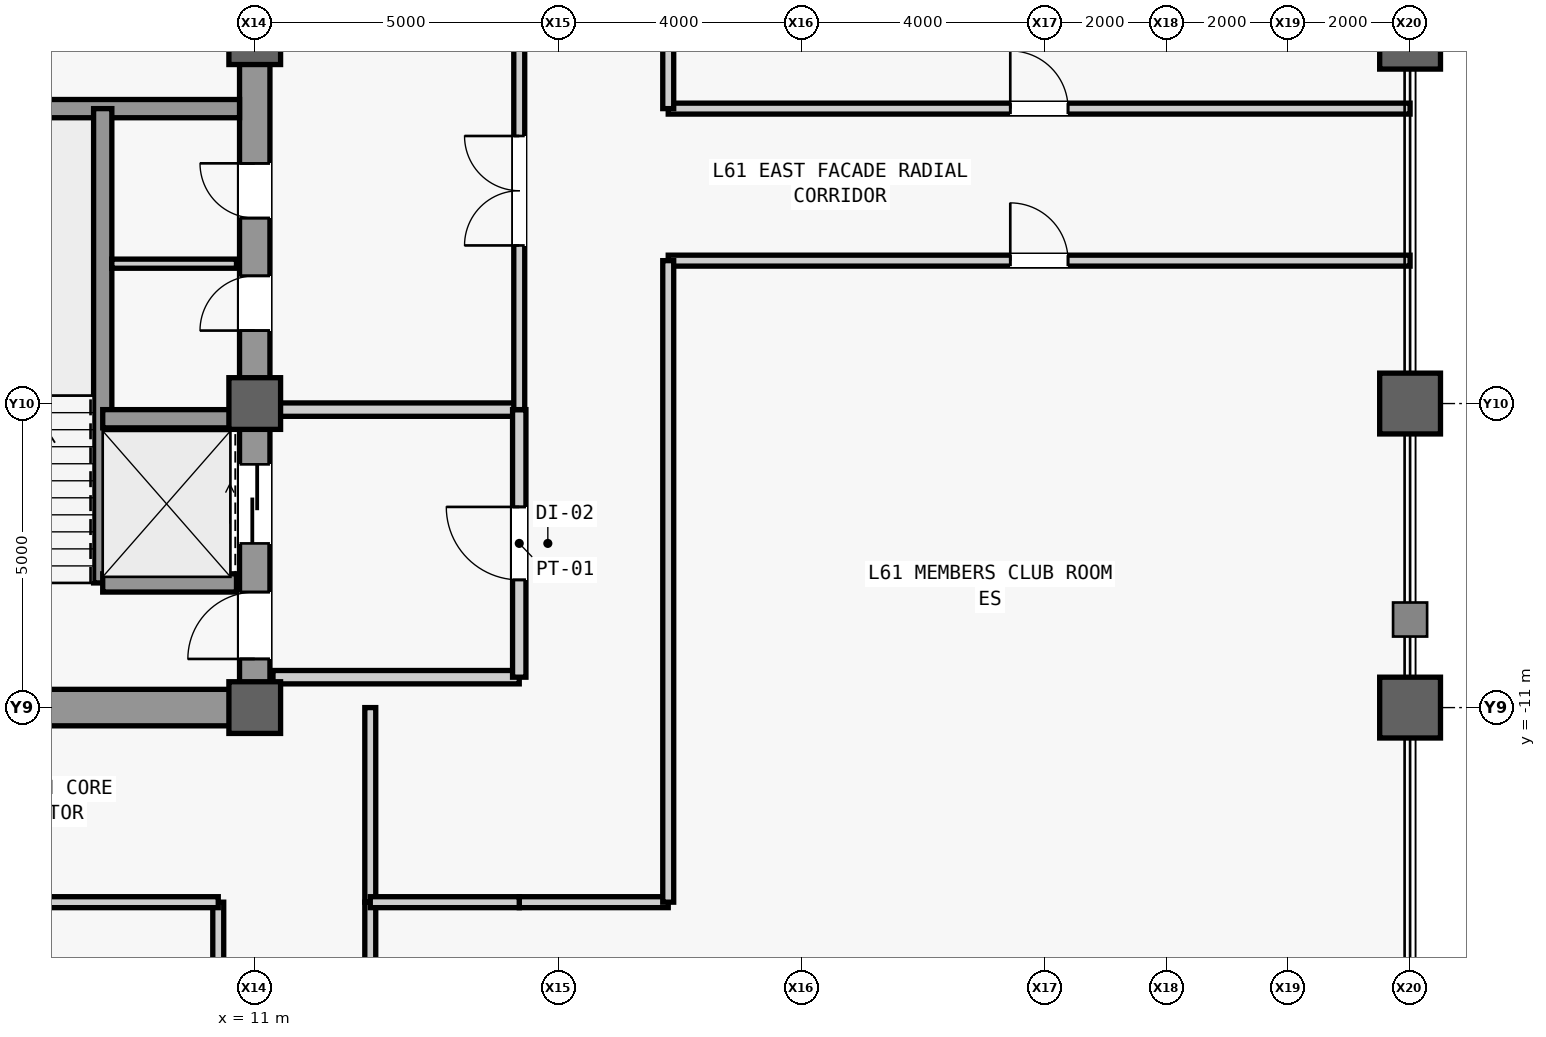
"""IFC4 building model, lengths in metres.
Left out: names, types, materials, properties, quantities, classifications, styles, units other than length and angle.
Written with IfcOpenShell. Run it as: python <this file> out.ifc"""

import sys

from ifc_helpers import new_model, si_unit, direction, frame, frame_2d, origin, origin_2d, place, context, subcontext, project, spatial, rectangle, hollow_rectangle, extrude, source, transform, mapped, element, fill, save


model = new_model("IFC4")
c1 = context("Model", 3, precision=1e-05, world=origin(), true_north=direction((0.0, 1.0)))
c2 = subcontext(c1, "Body", "Model", "MODEL_VIEW")
j1 = project(units=[si_unit("LENGTHUNIT", "METRE"), si_unit("PLANEANGLEUNIT", "RADIAN")], contexts=[c1])
p1 = place(None, origin())
s1 = spatial("IfcSite", under=j1, at=p1, CompositionType="ELEMENT")
p2 = place(p1, origin())
s2 = spatial("IfcBuilding", under=s1, at=p2, CompositionType="ELEMENT")
p3 = place(p2, frame((0.0, 0.0, 259.1)))
s3 = spatial("IfcBuildingStorey", under=s2, at=p3, CompositionType="ELEMENT", Elevation=259.1)
m1 = source(origin(), c2, "Body", "SweptSolid", [
    extrude(rectangle(XDim=22.0, YDim=0.5, at=frame_2d((11.0, 0.0))), origin(), (0.0, 0.0, 1.0), 3.78),
])
p4 = place(p3, frame((11.0, -11.0, 0.0), z_axis=(0.0, 0.0, 1.0), x_axis=(0.0, 1.0, 0.0)))
e1 = element("IfcWall", 1, at=p4, inside=s3, PredefinedType="SHEAR", context=c2, shape_type="MappedRepresentation", body=[
    mapped(m1, transform((0.0, 0.0, 0.0), scale=1.0)),
])
m2 = source(origin(), c2, "Body", "SweptSolid", [
    extrude(rectangle(XDim=1.1, YDim=2.2, at=frame_2d((0.55, 1.1))), frame((0.0, 0.26, 0.0), z_axis=(0.0, -1.0, 0.0), x_axis=(1.0, 0.0, 0.0)), (0.0, 0.0, 1.0), 0.52),
])
p5 = place(p4, frame((0.8, 0.0, 0.0)))
e2 = element("IfcOpeningElement", 2, at=p5, cuts=e1, PredefinedType="OPENING", context=c2, shape_type="MappedRepresentation", body=[
    mapped(m2, transform((0.0, 0.0, 0.0), scale=1.0)),
])
m3 = source(origin(), c2, "Body", "SweptSolid", [
    extrude(rectangle(XDim=0.9, YDim=2.15, at=frame_2d((0.45, 1.075))), frame((0.0, 0.26, 0.0), z_axis=(0.0, -1.0, 0.0), x_axis=(1.0, 0.0, 0.0)), (0.0, 0.0, 1.0), 0.52),
])
p6 = place(p4, frame((6.2, 0.0, 0.0)))
e3 = element("IfcOpeningElement", 3, at=p6, cuts=e1, PredefinedType="OPENING", context=c2, shape_type="MappedRepresentation", body=[
    mapped(m3, transform((0.0, 0.0, 0.0), scale=1.0)),
])
p7 = place(p4, frame((8.05, 0.0, 0.0)))
e4 = element("IfcOpeningElement", 4, at=p7, cuts=e1, PredefinedType="OPENING", context=c2, shape_type="MappedRepresentation", body=[
    mapped(m3, transform((0.0, 0.0, 0.0), scale=1.0)),
])
m4 = source(origin(), c2, "Body", "SweptSolid", [
    extrude(rectangle(XDim=1.3, YDim=2.3, at=frame_2d((0.65, 1.15))), frame((0.0, 0.26, 0.0), z_axis=(0.0, -1.0, 0.0), x_axis=(1.0, 0.0, 0.0)), (0.0, 0.0, 1.0), 0.52),
])
p8 = place(p4, frame((2.7, 0.0, 0.0)))
e5 = element("IfcOpeningElement", 5, at=p8, cuts=e1, PredefinedType="OPENING", context=c2, shape_type="MappedRepresentation", body=[
    mapped(m4, transform((0.0, 0.0, 0.0), scale=1.0)),
])
p9 = place(p4, frame((13.35, 0.0, 0.0)))
e6 = element("IfcOpeningElement", 6, at=p9, cuts=e1, PredefinedType="OPENING", context=c2, shape_type="MappedRepresentation", body=[
    mapped(m4, transform((0.0, 0.0, 0.0), scale=1.0)),
])
m5 = source(origin(), c2, "Body", "SweptSolid", [
    extrude(rectangle(XDim=5.9, YDim=0.6, at=frame_2d((2.95, 0.0))), origin(), (0.0, 0.0, 1.0), 3.78),
])
p10 = place(p3, frame((4.85, -11.0, 0.0), z_axis=(0.0, 0.0, 1.0), x_axis=(1.0, 0.0, 0.0)))
e7 = element("IfcWall", 7, at=p10, inside=s3, PredefinedType="SHEAR", context=c2, shape_type="MappedRepresentation", body=[
    mapped(m5, transform((0.0, 0.0, 0.0), scale=1.0)),
])
m6 = source(origin(), c2, "Body", "SweptSolid", [
    extrude(rectangle(XDim=5.65, YDim=0.3, at=frame_2d((2.825, 0.0))), origin(), (0.0, 0.0, 1.0), 3.78),
])
p11 = place(p3, frame((5.1, -1.15, 0.0), z_axis=(0.0, 0.0, 1.0), x_axis=(1.0, 0.0, 0.0)))
e8 = element("IfcWall", 8, at=p11, inside=s3, PredefinedType="SHEAR", context=c2, shape_type="MappedRepresentation", body=[
    mapped(m6, transform((0.0, 0.0, 0.0), scale=1.0)),
])
m7 = source(origin(), c2, "Body", "SweptSolid", [
    extrude(rectangle(XDim=0.85, YDim=0.85, at=origin_2d()), origin(), (0.0, 0.0, 1.0), 4.0),
])
for number, where, z_axis, x_axis in (
    (9, (11.0, -11.0, 0.0), (0.0, 0.0, 1.0), (1.0, 0.0, 0.0)),
    (10, (11.0, -6.0, 0.0), (0.0, 0.0, 1.0), (1.0, 0.0, 0.0)),
    (11, (11.0, 0.0, 0.0), (0.0, 0.0, 1.0), (1.0, 0.0, 0.0)),
):
    element("IfcColumn", number, at=place(p3, frame(where, z_axis=z_axis, x_axis=x_axis)), inside=s3, PredefinedType="COLUMN", context=c2, shape_type="MappedRepresentation", body=[
        mapped(m7, transform((0.0, 0.0, 0.0), scale=1.0)),
    ])
m8 = source(origin(), c2, "Body", "SweptSolid", [
    extrude(hollow_rectangle(XDim=1.0, YDim=1.0, WallThickness=0.055, at=origin_2d()), origin(), (0.0, 0.0, 1.0), 4.0),
])
for number, where, z_axis, x_axis in (
    (12, (30.0, -11.0, 0.0), (0.0, 0.0, 1.0), (1.0, 0.0, 0.0)),
    (13, (30.0, -6.0, 0.0), (0.0, 0.0, 1.0), (1.0, 0.0, 0.0)),
    (14, (30.0, 0.0, 0.0), (0.0, 0.0, 1.0), (1.0, 0.0, 0.0)),
):
    element("IfcColumn", number, at=place(p3, frame(where, z_axis=z_axis, x_axis=x_axis)), inside=s3, PredefinedType="COLUMN", context=c2, shape_type="MappedRepresentation", body=[
        mapped(m8, transform((0.0, 0.0, 0.0), scale=1.0)),
    ])
m9 = source(origin(), c2, "Body", "SweptSolid", [
    extrude(rectangle(XDim=7.8, YDim=0.3, at=frame_2d((3.9, 0.0))), origin(), (0.0, 0.0, 1.0), 3.78),
])
p12 = place(p3, frame((8.5, -8.95, 0.0), z_axis=(0.0, 0.0, 1.0), x_axis=(0.0, 1.0, 0.0)))
e15 = element("IfcWall", 15, at=p12, inside=s3, PredefinedType="SHEAR", context=c2, shape_type="MappedRepresentation", body=[
    mapped(m9, transform((0.0, 0.0, 0.0), scale=1.0)),
])
m10 = source(origin(), c2, "Body", "SweptSolid", [
    extrude(rectangle(XDim=2.2, YDim=0.3, at=frame_2d((1.1, 0.0))), origin(), (0.0, 0.0, 1.0), 3.78),
])
for number, where, z_axis, x_axis in (
    (16, (8.5, -8.95, 0.0), (0.0, 0.0, 1.0), (1.0, 0.0, 0.0)),
    (17, (8.5, -6.25, 0.0), (0.0, 0.0, 1.0), (1.0, 0.0, 0.0)),
):
    element("IfcWall", number, at=place(p3, frame(where, z_axis=z_axis, x_axis=x_axis)), inside=s3, PredefinedType="SHEAR", context=c2, shape_type="MappedRepresentation", body=[
        mapped(m10, transform((0.0, 0.0, 0.0), scale=1.0)),
    ])
m11 = source(origin(), c2, "Body", "SweptSolid", [
    extrude(rectangle(XDim=2.05, YDim=0.15, at=frame_2d((1.025, 0.0))), origin(), (0.0, 0.0, 1.0), 3.78),
])
p13 = place(p3, frame((8.65, -3.7, 0.0), z_axis=(0.0, 0.0, 1.0), x_axis=(1.0, 0.0, 0.0)))
e18 = element("IfcWall", 18, at=p13, inside=s3, PredefinedType="PARTITIONING", context=c2, shape_type="MappedRepresentation", body=[
    mapped(m11, transform((0.0, 0.0, 0.0), scale=1.0)),
])
m12 = source(origin(), c2, "Body", "SweptSolid", [
    extrude(rectangle(XDim=4.05, YDim=0.22, at=frame_2d((2.025, 0.0))), origin(), (0.0, 0.0, 1.0), 3.78),
])
p14 = place(p3, frame((11.3, -10.5, 0.0), z_axis=(0.0, 0.0, 1.0), x_axis=(1.0, 0.0, 0.0)))
e19 = element("IfcWall", 19, at=p14, inside=s3, PredefinedType="PARTITIONING", context=c2, shape_type="MappedRepresentation", body=[
    mapped(m12, transform((0.0, 0.0, 0.0), scale=1.0)),
])
m13 = source(origin(), c2, "Body", "SweptSolid", [
    extrude(rectangle(XDim=4.05, YDim=0.22, at=frame_2d((2.025, 0.0))), origin(), (0.0, 0.0, 1.0), 3.085),
])
p15 = place(p3, frame((11.3, -6.1, 0.0), z_axis=(0.0, 0.0, 1.0), x_axis=(1.0, 0.0, 0.0)))
e20 = element("IfcWall", 20, at=p15, inside=s3, PredefinedType="PARTITIONING", context=c2, shape_type="MappedRepresentation", body=[
    mapped(m13, transform((0.0, 0.0, 0.0), scale=1.0)),
])
m14 = source(origin(), c2, "Body", "SweptSolid", [
    extrude(rectangle(XDim=4.4, YDim=0.22, at=frame_2d((2.2, 0.0))), origin(), (0.0, 0.0, 1.0), 3.78),
])
p16 = place(p3, frame((15.35, -10.5, 0.0), z_axis=(0.0, 0.0, 1.0), x_axis=(0.0, 1.0, 0.0)))
e21 = element("IfcWall", 21, at=p16, inside=s3, PredefinedType="PARTITIONING", context=c2, shape_type="MappedRepresentation", body=[
    mapped(m14, transform((0.0, 0.0, 0.0), scale=1.0)),
])
m15 = source(origin(), c2, "Body", "SweptSolid", [
    extrude(rectangle(XDim=1.2, YDim=2.2, at=frame_2d((0.6, 1.1))), frame((0.0, 0.12, 0.0), z_axis=(0.0, -1.0, 0.0), x_axis=(1.0, 0.0, 0.0)), (0.0, 0.0, 1.0), 0.24),
])
p17 = place(p16, frame((1.6, 0.0, 0.0)))
e22 = element("IfcOpeningElement", 22, at=p17, cuts=e21, PredefinedType="OPENING", context=c2, shape_type="MappedRepresentation", body=[
    mapped(m15, transform((0.0, 0.0, 0.0), scale=1.0)),
])
m16 = source(origin(), c2, "Body", "SweptSolid", [
    extrude(rectangle(XDim=16.6, YDim=0.18, at=frame_2d((8.3, 0.0))), origin(), (0.0, 0.0, 1.0), 3.78),
])
p18 = place(p3, frame((15.35, -6.1, 0.0), z_axis=(0.0, 0.0, 1.0), x_axis=(0.0, 1.0, 0.0)))
e23 = element("IfcWall", 23, at=p18, inside=s3, PredefinedType="PARTITIONING", context=c2, shape_type="MappedRepresentation", body=[
    mapped(m16, transform((0.0, 0.0, 0.0), scale=1.0)),
])
m17 = source(origin(), c2, "Body", "SweptSolid", [
    extrude(rectangle(XDim=1.8, YDim=2.25, at=frame_2d((0.9, 1.125))), frame((0.0, 0.1, 0.0), z_axis=(0.0, -1.0, 0.0), x_axis=(1.0, 0.0, 0.0)), (0.0, 0.0, 1.0), 0.2),
])
p19 = place(p18, frame((2.7, 0.0, 0.0)))
e24 = element("IfcOpeningElement", 24, at=p19, cuts=e23, PredefinedType="OPENING", context=c2, shape_type="MappedRepresentation", body=[
    mapped(m17, transform((0.0, 0.0, 0.0), scale=1.0)),
])
p20 = place(p18, frame((13.0, 0.0, 0.0)))
e25 = element("IfcOpeningElement", 25, at=p20, cuts=e23, PredefinedType="OPENING", context=c2, shape_type="MappedRepresentation", body=[
    mapped(m17, transform((0.0, 0.0, 0.0), scale=1.0)),
])
m18 = source(origin(), c2, "Body", "SweptSolid", [
    extrude(rectangle(XDim=2.45, YDim=0.18, at=frame_2d((1.225, 0.0))), origin(), (0.0, 0.0, 1.0), 3.78),
])
p21 = place(p3, frame((15.35, -14.2, 0.0), z_axis=(0.0, 0.0, 1.0), x_axis=(1.0, 0.0, 0.0)))
e26 = element("IfcWall", 26, at=p21, inside=s3, PredefinedType="PARTITIONING", context=c2, shape_type="MappedRepresentation", body=[
    mapped(m18, transform((0.0, 0.0, 0.0), scale=1.0)),
])
m19 = source(origin(), c2, "Body", "SweptSolid", [
    extrude(rectangle(XDim=3.2, YDim=0.18, at=frame_2d((1.6, 0.0))), origin(), (0.0, 0.0, 1.0), 3.78),
])
p22 = place(p3, frame((12.9, -14.2, 0.0), z_axis=(0.0, 0.0, 1.0), x_axis=(0.0, 1.0, 0.0)))
e27 = element("IfcWall", 27, at=p22, inside=s3, PredefinedType="PARTITIONING", context=c2, shape_type="MappedRepresentation", body=[
    mapped(m19, transform((0.0, 0.0, 0.0), scale=1.0)),
])
m20 = source(origin(), c2, "Body", "SweptSolid", [
    extrude(rectangle(XDim=15.8, YDim=0.18, at=frame_2d((7.9, 0.0))), origin(), (0.0, 0.0, 1.0), 3.78),
])
p23 = place(p3, frame((10.4, -30.0, 0.0), z_axis=(0.0, 0.0, 1.0), x_axis=(0.0, 1.0, 0.0)))
e28 = element("IfcWall", 28, at=p23, inside=s3, PredefinedType="PARTITIONING", context=c2, shape_type="MappedRepresentation", body=[
    mapped(m20, transform((0.0, 0.0, 0.0), scale=1.0)),
])
m21 = source(origin(), c2, "Body", "SweptSolid", [
    extrude(rectangle(XDim=1.05, YDim=2.2, at=frame_2d((0.525, 1.1))), frame((0.0, 0.1, 0.0), z_axis=(0.0, -1.0, 0.0), x_axis=(1.0, 0.0, 0.0)), (0.0, 0.0, 1.0), 0.2),
])
p24 = place(p23, frame((3.425, 0.0, 0.0)))
e29 = element("IfcOpeningElement", 29, at=p24, cuts=e28, PredefinedType="OPENING", context=c2, shape_type="MappedRepresentation", body=[
    mapped(m21, transform((0.0, 0.0, 0.0), scale=1.0)),
])
m22 = source(origin(), c2, "Body", "SweptSolid", [
    extrude(rectangle(XDim=25.75, YDim=0.18, at=frame_2d((12.875, 0.0))), origin(), (0.0, 0.0, 1.0), 3.78),
])
p25 = place(p3, frame((-15.35, -14.2, 0.0), z_axis=(0.0, 0.0, 1.0), x_axis=(1.0, 0.0, 0.0)))
e30 = element("IfcWall", 30, at=p25, inside=s3, PredefinedType="PARTITIONING", context=c2, shape_type="MappedRepresentation", body=[
    mapped(m22, transform((0.0, 0.0, 0.0), scale=1.0)),
])
p26 = place(p3, frame((12.9, -30.0, 0.0), z_axis=(0.0, 0.0, 1.0), x_axis=(0.0, 1.0, 0.0)))
e31 = element("IfcWall", 31, at=p26, inside=s3, PredefinedType="PARTITIONING", context=c2, shape_type="MappedRepresentation", body=[
    mapped(m20, transform((0.0, 0.0, 0.0), scale=1.0)),
])
p27 = place(p26, frame((3.425, 0.0, 0.0)))
e32 = element("IfcOpeningElement", 32, at=p27, cuts=e31, PredefinedType="OPENING", context=c2, shape_type="MappedRepresentation", body=[
    mapped(m21, transform((0.0, 0.0, 0.0), scale=1.0)),
])
m23 = source(origin(), c2, "Body", "SweptSolid", [
    extrude(rectangle(XDim=2.45, YDim=0.18, at=frame_2d((1.225, 0.0))), origin(), (0.0, 0.0, 1.0), 3.78),
])
p28 = place(p3, frame((12.9, -14.2, 0.0), z_axis=(0.0, 0.0, 1.0), x_axis=(1.0, 0.0, 0.0)))
e33 = element("IfcWall", 33, at=p28, inside=s3, PredefinedType="PARTITIONING", context=c2, shape_type="MappedRepresentation", body=[
    mapped(m23, transform((0.0, 0.0, 0.0), scale=1.0)),
])
m24 = source(origin(), c2, "Body", "SweptSolid", [
    extrude(rectangle(XDim=12.2, YDim=0.18, at=frame_2d((6.1, 0.0))), origin(), (0.0, 0.0, 1.0), 3.78),
])
p29 = place(p3, frame((17.8, -3.65, 0.0), z_axis=(0.0, 0.0, 1.0), x_axis=(1.0, 0.0, 0.0)))
e34 = element("IfcWall", 34, at=p29, inside=s3, PredefinedType="PARTITIONING", context=c2, shape_type="MappedRepresentation", body=[
    mapped(m24, transform((0.0, 0.0, 0.0), scale=1.0)),
])
m25 = source(origin(), c2, "Body", "SweptSolid", [
    extrude(rectangle(XDim=0.95, YDim=2.15, at=frame_2d((0.475, 1.075))), frame((0.0, 0.1, 0.0), z_axis=(0.0, -1.0, 0.0), x_axis=(1.0, 0.0, 0.0)), (0.0, 0.0, 1.0), 0.2),
])
p30 = place(p29, frame((5.625, 0.0, 0.0)))
e35 = element("IfcOpeningElement", 35, at=p30, cuts=e34, PredefinedType="OPENING", context=c2, shape_type="MappedRepresentation", body=[
    mapped(m25, transform((0.0, 0.0, 0.0), scale=1.0)),
])
m26 = source(origin(), c2, "Body", "SweptSolid", [
    extrude(rectangle(XDim=10.55, YDim=0.18, at=frame_2d((5.275, 0.0))), origin(), (0.0, 0.0, 1.0), 3.78),
])
p31 = place(p3, frame((17.8, -14.2, 0.0), z_axis=(0.0, 0.0, 1.0), x_axis=(0.0, 1.0, 0.0)))
e36 = element("IfcWall", 36, at=p31, inside=s3, PredefinedType="PARTITIONING", context=c2, shape_type="MappedRepresentation", body=[
    mapped(m26, transform((0.0, 0.0, 0.0), scale=1.0)),
])
p32 = place(p3, frame((17.8, -1.15, 0.0), z_axis=(0.0, 0.0, 1.0), x_axis=(1.0, 0.0, 0.0)))
e37 = element("IfcWall", 37, at=p32, inside=s3, PredefinedType="PARTITIONING", context=c2, shape_type="MappedRepresentation", body=[
    mapped(m24, transform((0.0, 0.0, 0.0), scale=1.0)),
])
p33 = place(p32, frame((5.625, 0.0, 0.0)))
e38 = element("IfcOpeningElement", 38, at=p33, cuts=e37, PredefinedType="OPENING", context=c2, shape_type="MappedRepresentation", body=[
    mapped(m25, transform((0.0, 0.0, 0.0), scale=1.0)),
])
m27 = source(origin(), c2, "Body", "SweptSolid", [
    extrude(rectangle(XDim=14.65, YDim=0.18, at=frame_2d((7.325, 0.0))), origin(), (0.0, 0.0, 1.0), 3.78),
])
p34 = place(p3, frame((17.8, -1.15, 0.0), z_axis=(0.0, 0.0, 1.0), x_axis=(0.0, 1.0, 0.0)))
e39 = element("IfcWall", 39, at=p34, inside=s3, PredefinedType="PARTITIONING", context=c2, shape_type="MappedRepresentation", body=[
    mapped(m27, transform((0.0, 0.0, 0.0), scale=1.0)),
])
m28 = source(origin(), c2, "Body", "SweptSolid", [
    extrude(rectangle(XDim=1.1, YDim=2.2, at=frame_2d((0.55, 1.1))), frame((0.0, 0.025, 0.0), z_axis=(0.0, -1.0, 0.0), x_axis=(1.0, 0.0, 0.0)), (0.0, 0.0, 1.0), 0.05),
])
p35 = place(p5, origin())
e40 = element("IfcDoor", 40, at=p35, inside=s3, OperationType="SINGLE_SWING_LEFT", PredefinedType="DOOR", context=c2, shape_type="MappedRepresentation", body=[
    mapped(m28, transform((0.0, 0.0, 0.0), scale=1.0)),
])
fill(e2, e40)
m29 = source(origin(), c2, "Body", "SweptSolid", [
    extrude(rectangle(XDim=0.9, YDim=2.15, at=frame_2d((0.45, 1.075))), frame((0.0, 0.025, 0.0), z_axis=(0.0, -1.0, 0.0), x_axis=(1.0, 0.0, 0.0)), (0.0, 0.0, 1.0), 0.05),
])
p36 = place(p6, origin())
e41 = element("IfcDoor", 41, at=p36, inside=s3, OperationType="SINGLE_SWING_LEFT", PredefinedType="DOOR", context=c2, shape_type="MappedRepresentation", body=[
    mapped(m29, transform((0.0, 0.0, 0.0), scale=1.0)),
])
fill(e3, e41)
p37 = place(p7, origin())
e42 = element("IfcDoor", 42, at=p37, inside=s3, OperationType="SINGLE_SWING_RIGHT", PredefinedType="DOOR", context=c2, shape_type="MappedRepresentation", body=[
    mapped(m29, transform((0.0, 0.0, 0.0), scale=1.0)),
])
fill(e4, e42)
m30 = source(origin(), c2, "Body", "SweptSolid", [
    extrude(rectangle(XDim=1.2, YDim=2.2, at=frame_2d((0.6, 1.1))), frame((0.0, 0.025, 0.0), z_axis=(0.0, -1.0, 0.0), x_axis=(1.0, 0.0, 0.0)), (0.0, 0.0, 1.0), 0.05),
])
p38 = place(p17, origin())
e43 = element("IfcDoor", 43, at=p38, inside=s3, OperationType="SINGLE_SWING_RIGHT", PredefinedType="DOOR", context=c2, shape_type="MappedRepresentation", body=[
    mapped(m30, transform((0.0, 0.0, 0.0), scale=1.0)),
])
fill(e22, e43)
m31 = source(origin(), c2, "Body", "SweptSolid", [
    extrude(rectangle(XDim=1.8, YDim=2.25, at=frame_2d((0.9, 1.125))), frame((0.0, 0.025, 0.0), z_axis=(0.0, -1.0, 0.0), x_axis=(1.0, 0.0, 0.0)), (0.0, 0.0, 1.0), 0.05),
])
p39 = place(p19, origin())
e44 = element("IfcDoor", 44, at=p39, inside=s3, OperationType="SINGLE_SWING_RIGHT", PredefinedType="DOOR", context=c2, shape_type="MappedRepresentation", body=[
    mapped(m31, transform((0.0, 0.0, 0.0), scale=1.0)),
])
fill(e24, e44)
m32 = source(origin(), c2, "Body", "SweptSolid", [
    extrude(rectangle(XDim=0.95, YDim=2.15, at=frame_2d((0.475, 1.075))), frame((0.0, 0.025, 0.0), z_axis=(0.0, -1.0, 0.0), x_axis=(1.0, 0.0, 0.0)), (0.0, 0.0, 1.0), 0.05),
])
p40 = place(p30, origin())
e45 = element("IfcDoor", 45, at=p40, inside=s3, OperationType="SINGLE_SWING_LEFT", PredefinedType="DOOR", context=c2, shape_type="MappedRepresentation", body=[
    mapped(m32, transform((0.0, 0.0, 0.0), scale=1.0)),
])
fill(e35, e45)
p41 = place(p33, origin())
e46 = element("IfcDoor", 46, at=p41, inside=s3, OperationType="SINGLE_SWING_LEFT", PredefinedType="DOOR", context=c2, shape_type="MappedRepresentation", body=[
    mapped(m32, transform((0.0, 0.0, 0.0), scale=1.0)),
])
fill(e38, e46)
m33 = source(origin(), c2, "Body", "SweptSolid", [
    extrude(rectangle(XDim=1.3, YDim=2.3, at=frame_2d((0.65, 1.15))), frame((0.0, 0.025, 0.0), z_axis=(0.0, -1.0, 0.0), x_axis=(1.0, 0.0, 0.0)), (0.0, 0.0, 1.0), 0.05),
])
p42 = place(p8, origin())
e47 = element("IfcDoor", 47, at=p42, inside=s3, OperationType="SLIDING_TO_LEFT", PredefinedType="DOOR", context=c2, shape_type="MappedRepresentation", body=[
    mapped(m33, transform((0.0, 0.0, 0.0), scale=1.0)),
])
fill(e5, e47)
save(model, sys.argv[1])
